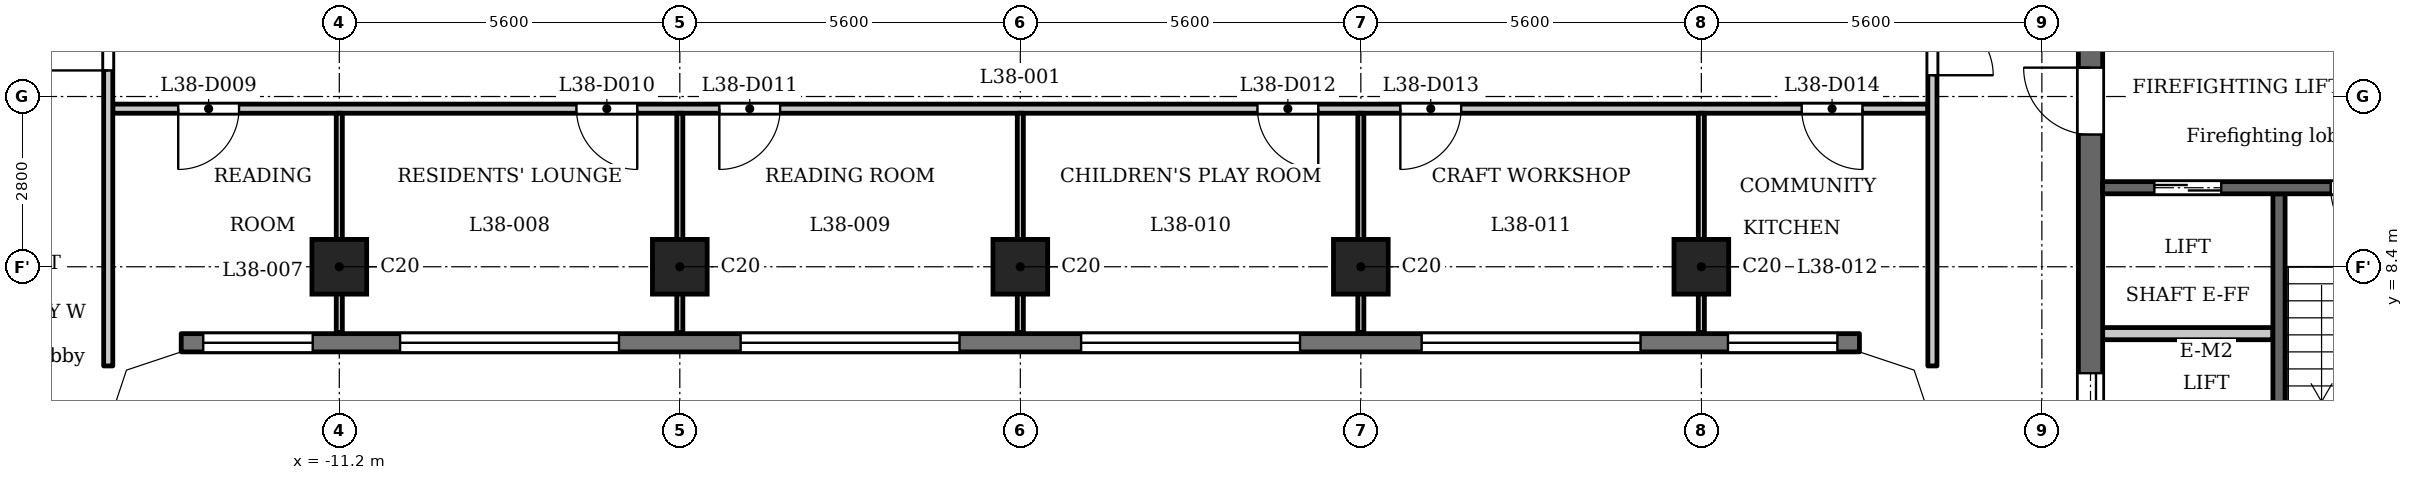
"""IFC4 building model, lengths in metres.
Left out: names, types, materials, properties, quantities, classifications, styles, units other than length and angle.
Written with IfcOpenShell. Run it as: python <this file> out.ifc"""

import sys

from ifc_helpers import new_model, si_unit, direction, frame, frame_2d, origin, origin_2d, place, context, subcontext, project, spatial, polyline, rectangle, outline, extrude, element, fill, save


model = new_model("IFC4")
c1 = context("Model", 3, precision=1e-05, world=origin(), true_north=direction((0.0, 1.0)))
c2 = subcontext(c1, "Body", "Model", "MODEL_VIEW")
j1 = project(units=[si_unit("LENGTHUNIT", "METRE"), si_unit("PLANEANGLEUNIT", "RADIAN")], contexts=[c1])
p1 = place(None, origin())
s1 = spatial("IfcSite", under=j1, at=p1, CompositionType="ELEMENT")
p2 = place(p1, origin())
s2 = spatial("IfcBuilding", under=s1, at=p2, CompositionType="ELEMENT")
p3 = place(p2, frame((0.0, 0.0, 150.1)))
s3 = spatial("IfcBuildingStorey", under=s2, at=p3, CompositionType="ELEMENT", Elevation=150.1)
for number, where, z_axis, x_axis in (
    (1, (-11.2, 8.4, 0.0), (0.0, 0.0, 1.0), (1.0, 0.0, 0.0)),
    (2, (-5.6, 8.4, 0.0), (0.0, 0.0, 1.0), (1.0, 0.0, 0.0)),
    (3, (0.0, 8.4, 0.0), (0.0, 0.0, 1.0), (1.0, 0.0, 0.0)),
    (4, (5.6, 8.4, 0.0), (0.0, 0.0, 1.0), (1.0, 0.0, 0.0)),
    (5, (11.2, 8.4, 0.0), (0.0, 0.0, 1.0), (1.0, 0.0, 0.0)),
):
    element("IfcColumn", number, at=place(p3, frame(where, z_axis=z_axis, x_axis=x_axis)), inside=s3, PredefinedType="COLUMN", context=c2, shape_type="SweptSolid", body=[
        extrude(rectangle(XDim=0.9, YDim=0.9, at=origin_2d()), origin(), (0.0, 0.0, 1.0), 3.5),
    ])
p4 = place(p3, frame((-13.8, 7.15, 0.0), z_axis=(0.0, 0.0, 1.0), x_axis=(1.0, 0.0, 0.0)))
e6 = element("IfcWall", 6, at=p4, inside=s3, PredefinedType="SOLIDWALL", context=c2, shape_type="SweptSolid", body=[
    extrude(rectangle(XDim=27.6, YDim=0.3, at=frame_2d((13.8, 0.0))), origin(), (0.0, 0.0, 1.0), 3.2),
])
p5 = place(p4, frame((0.363, 0.0, 0.9)))
e7 = element("IfcOpeningElement", 7, at=p5, cuts=e6, PredefinedType="OPENING", context=c2, shape_type="SweptSolid", body=[
    extrude(rectangle(XDim=1.8, YDim=1.25, at=frame_2d((0.9, 0.625))), frame((0.0, 0.16, 0.0), z_axis=(0.0, -1.0, 0.0), x_axis=(1.0, 0.0, 0.0)), (0.0, 0.0, 1.0), 0.32),
])
p6 = place(p4, frame((3.6, 0.0, 1.2)))
e8 = element("IfcOpeningElement", 8, at=p6, cuts=e6, PredefinedType="OPENING", context=c2, shape_type="SweptSolid", body=[
    extrude(rectangle(XDim=3.6, YDim=0.95, at=frame_2d((1.8, 0.475))), frame((0.0, 0.16, 0.0), z_axis=(0.0, -1.0, 0.0), x_axis=(1.0, 0.0, 0.0)), (0.0, 0.0, 1.0), 0.32),
])
p7 = place(p4, frame((9.2, 0.0, 1.2)))
e9 = element("IfcOpeningElement", 9, at=p7, cuts=e6, PredefinedType="OPENING", context=c2, shape_type="SweptSolid", body=[
    extrude(rectangle(XDim=3.6, YDim=0.95, at=frame_2d((1.8, 0.475))), frame((0.0, 0.16, 0.0), z_axis=(0.0, -1.0, 0.0), x_axis=(1.0, 0.0, 0.0)), (0.0, 0.0, 1.0), 0.32),
])
p8 = place(p4, frame((14.8, 0.0, 1.2)))
e10 = element("IfcOpeningElement", 10, at=p8, cuts=e6, PredefinedType="OPENING", context=c2, shape_type="SweptSolid", body=[
    extrude(rectangle(XDim=3.6, YDim=0.95, at=frame_2d((1.8, 0.475))), frame((0.0, 0.16, 0.0), z_axis=(0.0, -1.0, 0.0), x_axis=(1.0, 0.0, 0.0)), (0.0, 0.0, 1.0), 0.32),
])
p9 = place(p4, frame((20.4, 0.0, 1.2)))
e11 = element("IfcOpeningElement", 11, at=p9, cuts=e6, PredefinedType="OPENING", context=c2, shape_type="SweptSolid", body=[
    extrude(rectangle(XDim=3.6, YDim=0.95, at=frame_2d((1.8, 0.475))), frame((0.0, 0.16, 0.0), z_axis=(0.0, -1.0, 0.0), x_axis=(1.0, 0.0, 0.0)), (0.0, 0.0, 1.0), 0.32),
])
p10 = place(p4, frame((25.438, 0.0, 0.9)))
e12 = element("IfcOpeningElement", 12, at=p10, cuts=e6, PredefinedType="OPENING", context=c2, shape_type="SweptSolid", body=[
    extrude(rectangle(XDim=1.8, YDim=1.25, at=frame_2d((0.9, 0.625))), frame((0.0, 0.16, 0.0), z_axis=(0.0, -1.0, 0.0), x_axis=(1.0, 0.0, 0.0)), (0.0, 0.0, 1.0), 0.32),
])
p11 = place(p3, frame((20.7, 2.6, 0.0), z_axis=(0.0, 0.0, 1.0), x_axis=(0.0, 1.0, 0.0)))
e13 = element("IfcWall", 13, at=p11, inside=s3, PredefinedType="SHEAR", context=c2, shape_type="SweptSolid", body=[
    extrude(rectangle(XDim=7.0, YDim=0.2, at=frame_2d((3.5, 0.0))), origin(), (0.0, 0.0, 1.0), 3.2),
])
p12 = place(p3, frame((17.6, -12.45, 0.0), z_axis=(0.0, 0.0, 1.0), x_axis=(0.0, 1.0, 0.0)))
e14 = element("IfcWall", 14, at=p12, inside=s3, PredefinedType="SHEAR", context=c2, shape_type="SweptSolid", body=[
    extrude(rectangle(XDim=24.9, YDim=0.4, at=frame_2d((12.45, 0.0))), origin(), (0.0, 0.0, 1.0), 3.2),
])
p13 = place(p12, frame((6.325, 0.0, 0.0)))
e15 = element("IfcOpeningElement", 15, at=p13, cuts=e14, PredefinedType="OPENING", context=c2, shape_type="SweptSolid", body=[
    extrude(rectangle(XDim=0.9, YDim=2.1, at=frame_2d((0.45, 1.05))), frame((0.0, 0.21, 0.0), z_axis=(0.0, -1.0, 0.0), x_axis=(1.0, 0.0, 0.0)), (0.0, 0.0, 1.0), 0.42),
])
p14 = place(p12, frame((9.925, 0.0, 0.0)))
e16 = element("IfcOpeningElement", 16, at=p14, cuts=e14, PredefinedType="OPENING", context=c2, shape_type="SweptSolid", body=[
    extrude(rectangle(XDim=0.9, YDim=2.1, at=frame_2d((0.45, 1.05))), frame((0.0, 0.21, 0.0), z_axis=(0.0, -1.0, 0.0), x_axis=(1.0, 0.0, 0.0)), (0.0, 0.0, 1.0), 0.42),
])
p15 = place(p12, frame((15.6, 0.0, 0.0)))
e17 = element("IfcOpeningElement", 17, at=p15, cuts=e14, PredefinedType="OPENING", context=c2, shape_type="SweptSolid", body=[
    extrude(rectangle(XDim=1.1, YDim=2.1, at=frame_2d((0.55, 1.05))), frame((0.0, 0.21, 0.0), z_axis=(0.0, -1.0, 0.0), x_axis=(1.0, 0.0, 0.0)), (0.0, 0.0, 1.0), 0.42),
])
p16 = place(p12, frame((18.0, 0.0, 0.0)))
e18 = element("IfcOpeningElement", 18, at=p16, cuts=e14, PredefinedType="OPENING", context=c2, shape_type="SweptSolid", body=[
    extrude(rectangle(XDim=1.1, YDim=2.1, at=frame_2d((0.55, 1.05))), frame((0.0, 0.21, 0.0), z_axis=(0.0, -1.0, 0.0), x_axis=(1.0, 0.0, 0.0)), (0.0, 0.0, 1.0), 0.42),
])
p17 = place(p12, frame((23.025, 0.0, 0.0)))
e19 = element("IfcOpeningElement", 19, at=p17, cuts=e14, PredefinedType="OPENING", context=c2, shape_type="SweptSolid", body=[
    extrude(rectangle(XDim=1.1, YDim=2.1, at=frame_2d((0.55, 1.05))), frame((0.0, 0.21, 0.0), z_axis=(0.0, -1.0, 0.0), x_axis=(1.0, 0.0, 0.0)), (0.0, 0.0, 1.0), 0.42),
])
p18 = place(p12, frame((0.775, 0.0, 0.0)))
e20 = element("IfcOpeningElement", 20, at=p18, cuts=e14, PredefinedType="OPENING", context=c2, shape_type="SweptSolid", body=[
    extrude(rectangle(XDim=1.1, YDim=2.1, at=frame_2d((0.55, 1.05))), frame((0.0, 0.21, 0.0), z_axis=(0.0, -1.0, 0.0), x_axis=(1.0, 0.0, 0.0)), (0.0, 0.0, 1.0), 0.42),
])
p19 = place(p12, frame((12.925, 0.0, 0.0)))
e21 = element("IfcOpeningElement", 21, at=p19, cuts=e14, PredefinedType="OPENING", context=c2, shape_type="SweptSolid", body=[
    extrude(rectangle(XDim=1.8, YDim=2.1, at=frame_2d((0.9, 1.05))), frame((0.0, 0.21, 0.0), z_axis=(0.0, -1.0, 0.0), x_axis=(1.0, 0.0, 0.0)), (0.0, 0.0, 1.0), 0.42),
])
p20 = place(p3, frame((17.8, 7.3, 0.0), z_axis=(0.0, 0.0, 1.0), x_axis=(1.0, 0.0, 0.0)))
e22 = element("IfcWall", 22, at=p20, inside=s3, PredefinedType="PARTITIONING", context=c2, shape_type="SweptSolid", body=[
    extrude(rectangle(XDim=2.8, YDim=0.2, at=frame_2d((1.4, 0.0))), origin(), (0.0, 0.0, 1.0), 3.2),
])
p21 = place(p3, frame((17.8, 9.7, 0.0), z_axis=(0.0, 0.0, 1.0), x_axis=(1.0, 0.0, 0.0)))
e23 = element("IfcWall", 23, at=p21, inside=s3, PredefinedType="SHEAR", context=c2, shape_type="SweptSolid", body=[
    extrude(rectangle(XDim=8.45, YDim=0.2, at=frame_2d((4.225, 0.0))), origin(), (0.0, 0.0, 1.0), 3.2),
])
p22 = place(p21, frame((0.85, 0.0, 0.0)))
e24 = element("IfcOpeningElement", 24, at=p22, cuts=e23, PredefinedType="OPENING", context=c2, shape_type="SweptSolid", body=[
    extrude(rectangle(XDim=1.1, YDim=2.1, at=frame_2d((0.55, 1.05))), frame((0.0, 0.11, 0.0), z_axis=(0.0, -1.0, 0.0), x_axis=(1.0, 0.0, 0.0)), (0.0, 0.0, 1.0), 0.22),
])
p23 = place(p21, frame((3.75, 0.0, 0.0)))
e25 = element("IfcOpeningElement", 25, at=p23, cuts=e23, PredefinedType="OPENING", context=c2, shape_type="SweptSolid", body=[
    extrude(rectangle(XDim=1.1, YDim=2.1, at=frame_2d((0.55, 1.05))), frame((0.0, 0.11, 0.0), z_axis=(0.0, -1.0, 0.0), x_axis=(1.0, 0.0, 0.0)), (0.0, 0.0, 1.0), 0.22),
])
p24 = place(p3, frame((-14.925, 11.0, 0.0), z_axis=(0.0, 0.0, 1.0), x_axis=(1.0, 0.0, 0.0)))
e26 = element("IfcWall", 26, at=p24, inside=s3, PredefinedType="PARTITIONING", context=c2, shape_type="SweptSolid", body=[
    extrude(rectangle(XDim=29.85, YDim=0.15, at=frame_2d((14.925, 0.0))), origin(), (0.0, 0.0, 1.0), 3.2),
])
p25 = place(p24, frame((1.076, 0.0, 0.0)))
e27 = element("IfcOpeningElement", 27, at=p25, cuts=e26, PredefinedType="OPENING", context=c2, shape_type="SweptSolid", body=[
    extrude(rectangle(XDim=1.0, YDim=2.1, at=frame_2d((0.5, 1.05))), frame((0.0, 0.085, 0.0), z_axis=(0.0, -1.0, 0.0), x_axis=(1.0, 0.0, 0.0)), (0.0, 0.0, 1.0), 0.17),
])
p26 = place(p24, frame((7.625, 0.0, 0.0)))
e28 = element("IfcOpeningElement", 28, at=p26, cuts=e26, PredefinedType="OPENING", context=c2, shape_type="SweptSolid", body=[
    extrude(rectangle(XDim=1.0, YDim=2.1, at=frame_2d((0.5, 1.05))), frame((0.0, 0.085, 0.0), z_axis=(0.0, -1.0, 0.0), x_axis=(1.0, 0.0, 0.0)), (0.0, 0.0, 1.0), 0.17),
])
p27 = place(p24, frame((9.975, 0.0, 0.0)))
e29 = element("IfcOpeningElement", 29, at=p27, cuts=e26, PredefinedType="OPENING", context=c2, shape_type="SweptSolid", body=[
    extrude(rectangle(XDim=1.0, YDim=2.1, at=frame_2d((0.5, 1.05))), frame((0.0, 0.085, 0.0), z_axis=(0.0, -1.0, 0.0), x_axis=(1.0, 0.0, 0.0)), (0.0, 0.0, 1.0), 0.17),
])
p28 = place(p24, frame((18.825, 0.0, 0.0)))
e30 = element("IfcOpeningElement", 30, at=p28, cuts=e26, PredefinedType="OPENING", context=c2, shape_type="SweptSolid", body=[
    extrude(rectangle(XDim=1.0, YDim=2.1, at=frame_2d((0.5, 1.05))), frame((0.0, 0.085, 0.0), z_axis=(0.0, -1.0, 0.0), x_axis=(1.0, 0.0, 0.0)), (0.0, 0.0, 1.0), 0.17),
])
p29 = place(p24, frame((21.175, 0.0, 0.0)))
e31 = element("IfcOpeningElement", 31, at=p29, cuts=e26, PredefinedType="OPENING", context=c2, shape_type="SweptSolid", body=[
    extrude(rectangle(XDim=1.0, YDim=2.1, at=frame_2d((0.5, 1.05))), frame((0.0, 0.085, 0.0), z_axis=(0.0, -1.0, 0.0), x_axis=(1.0, 0.0, 0.0)), (0.0, 0.0, 1.0), 0.17),
])
p30 = place(p24, frame((27.775, 0.0, 0.0)))
e32 = element("IfcOpeningElement", 32, at=p30, cuts=e26, PredefinedType="OPENING", context=c2, shape_type="SweptSolid", body=[
    extrude(rectangle(XDim=1.0, YDim=2.1, at=frame_2d((0.5, 1.05))), frame((0.0, 0.085, 0.0), z_axis=(0.0, -1.0, 0.0), x_axis=(1.0, 0.0, 0.0)), (0.0, 0.0, 1.0), 0.17),
])
p31 = place(p3, frame((-15.0, 6.769, 0.0), z_axis=(0.0, 0.0, 1.0), x_axis=(0.0, 1.0, 0.0)))
e33 = element("IfcWall", 33, at=p31, inside=s3, PredefinedType="PARTITIONING", context=c2, shape_type="SweptSolid", body=[
    extrude(rectangle(XDim=6.356, YDim=0.15, at=frame_2d((3.178, 0.0))), origin(), (0.0, 0.0, 1.0), 3.2),
])
p32 = place(p31, frame((4.86, 0.0, 0.0)))
e34 = element("IfcOpeningElement", 34, at=p32, cuts=e33, PredefinedType="OPENING", context=c2, shape_type="SweptSolid", body=[
    extrude(rectangle(XDim=1.0, YDim=2.1, at=frame_2d((0.5, 1.05))), frame((0.0, 0.085, 0.0), z_axis=(0.0, -1.0, 0.0), x_axis=(1.0, 0.0, 0.0)), (0.0, 0.0, 1.0), 0.17),
])
for number, where, z_axis, x_axis in (
    (35, (-11.2, 7.32, 0.0), (0.0, 0.0, 1.0), (0.0, 1.0, 0.0)),
    (36, (-5.6, 7.32, 0.0), (0.0, 0.0, 1.0), (0.0, 1.0, 0.0)),
    (37, (0.0, 7.32, 0.0), (0.0, 0.0, 1.0), (0.0, 1.0, 0.0)),
    (38, (5.6, 7.32, 0.0), (0.0, 0.0, 1.0), (0.0, 1.0, 0.0)),
    (39, (11.2, 7.32, 0.0), (0.0, 0.0, 1.0), (0.0, 1.0, 0.0)),
):
    element("IfcWall", number, at=place(p3, frame(where, z_axis=z_axis, x_axis=x_axis)), inside=s3, PredefinedType="PARTITIONING", context=c2, shape_type="SweptSolid", body=[
        extrude(rectangle(XDim=3.605, YDim=0.1, at=frame_2d((1.802, 0.0))), origin(), (0.0, 0.0, 1.0), 3.2),
    ])
p33 = place(p3, frame((15.0, 6.769, 0.0), z_axis=(0.0, 0.0, 1.0), x_axis=(0.0, 1.0, 0.0)))
e40 = element("IfcWall", 40, at=p33, inside=s3, PredefinedType="PARTITIONING", context=c2, shape_type="SweptSolid", body=[
    extrude(rectangle(XDim=6.356, YDim=0.15, at=frame_2d((3.178, 0.0))), origin(), (0.0, 0.0, 1.0), 3.2),
])
p34 = place(p33, frame((4.781, 0.0, 0.0)))
e41 = element("IfcOpeningElement", 41, at=p34, cuts=e40, PredefinedType="OPENING", context=c2, shape_type="SweptSolid", body=[
    extrude(rectangle(XDim=1.0, YDim=2.1, at=frame_2d((0.5, 1.05))), frame((0.0, 0.085, 0.0), z_axis=(0.0, -1.0, 0.0), x_axis=(1.0, 0.0, 0.0)), (0.0, 0.0, 1.0), 0.17),
])
p35 = place(p3, origin())
e42 = element("IfcWall", 42, at=p35, inside=s3, PredefinedType="SOLIDWALL", context=c2, shape_type="SweptSolid", body=[
    extrude(outline(polyline([(-13.849, 7.3), (-14.937, 6.937), (-15.3, 5.849), (-15.3, 5.8), (-15.0, 5.8), (-14.7, 6.7), (-13.8, 7.0), (-13.8, 7.3), (-13.849, 7.3)])), origin(), (0.0, 0.0, 1.0), 3.2),
])
e43 = element("IfcWall", 43, at=p35, inside=s3, PredefinedType="SOLIDWALL", context=c2, shape_type="SweptSolid", body=[
    extrude(outline(polyline([(14.937, 6.937), (13.849, 7.3), (13.8, 7.3), (13.8, 7.0), (14.7, 6.7), (15.0, 5.8), (15.3, 5.8), (15.3, 5.849), (14.937, 6.937)])), origin(), (0.0, 0.0, 1.0), 3.2),
])
p36 = place(p16, origin())
e44 = element("IfcDoor", 44, at=p36, inside=s3, OperationType="DOUBLE_DOOR_SLIDING", PredefinedType="DOOR", context=c2, shape_type="SweptSolid", body=[
    extrude(rectangle(XDim=1.1, YDim=2.1, at=frame_2d((0.55, 1.05))), frame((0.0, 0.025, 0.0), z_axis=(0.0, -1.0, 0.0), x_axis=(1.0, 0.0, 0.0)), (0.0, 0.0, 1.0), 0.05),
])
fill(e18, e44)
p37 = place(p22, origin())
e45 = element("IfcDoor", 45, at=p37, inside=s3, OperationType="DOUBLE_DOOR_SLIDING", PredefinedType="DOOR", context=c2, shape_type="SweptSolid", body=[
    extrude(rectangle(XDim=1.1, YDim=2.1, at=frame_2d((0.55, 1.05))), frame((0.0, 0.025, 0.0), z_axis=(0.0, -1.0, 0.0), x_axis=(1.0, 0.0, 0.0)), (0.0, 0.0, 1.0), 0.05),
])
fill(e24, e45)
p38 = place(p17, origin())
e46 = element("IfcDoor", 46, at=p38, inside=s3, OperationType="SINGLE_SWING_LEFT", PredefinedType="DOOR", context=c2, shape_type="SweptSolid", body=[
    extrude(rectangle(XDim=1.1, YDim=2.1, at=frame_2d((0.55, 1.05))), frame((0.0, 0.025, 0.0), z_axis=(0.0, -1.0, 0.0), x_axis=(1.0, 0.0, 0.0)), (0.0, 0.0, 1.0), 0.05),
])
fill(e19, e46)
p39 = place(p23, origin())
e47 = element("IfcDoor", 47, at=p39, inside=s3, OperationType="SINGLE_SWING_RIGHT", PredefinedType="DOOR", context=c2, shape_type="SweptSolid", body=[
    extrude(rectangle(XDim=1.1, YDim=2.1, at=frame_2d((0.55, 1.05))), frame((0.0, 0.025, 0.0), z_axis=(0.0, -1.0, 0.0), x_axis=(1.0, 0.0, 0.0)), (0.0, 0.0, 1.0), 0.05),
])
fill(e25, e47)
p40 = place(p32, origin())
e48 = element("IfcDoor", 48, at=p40, inside=s3, OperationType="SINGLE_SWING_RIGHT", PredefinedType="DOOR", context=c2, shape_type="SweptSolid", body=[
    extrude(rectangle(XDim=1.0, YDim=2.1, at=frame_2d((0.5, 1.05))), frame((0.0, 0.025, 0.0), z_axis=(0.0, -1.0, 0.0), x_axis=(1.0, 0.0, 0.0)), (0.0, 0.0, 1.0), 0.05),
])
fill(e34, e48)
p41 = place(p34, origin())
e49 = element("IfcDoor", 49, at=p41, inside=s3, OperationType="SINGLE_SWING_LEFT", PredefinedType="DOOR", context=c2, shape_type="SweptSolid", body=[
    extrude(rectangle(XDim=1.0, YDim=2.1, at=frame_2d((0.5, 1.05))), frame((0.0, 0.025, 0.0), z_axis=(0.0, -1.0, 0.0), x_axis=(1.0, 0.0, 0.0)), (0.0, 0.0, 1.0), 0.05),
])
fill(e41, e49)
p42 = place(p25, origin())
e50 = element("IfcDoor", 50, at=p42, inside=s3, OperationType="SINGLE_SWING_LEFT", PredefinedType="DOOR", context=c2, shape_type="SweptSolid", body=[
    extrude(rectangle(XDim=1.0, YDim=2.1, at=frame_2d((0.5, 1.05))), frame((0.0, 0.025, 0.0), z_axis=(0.0, -1.0, 0.0), x_axis=(1.0, 0.0, 0.0)), (0.0, 0.0, 1.0), 0.05),
])
fill(e27, e50)
p43 = place(p26, origin())
e51 = element("IfcDoor", 51, at=p43, inside=s3, OperationType="SINGLE_SWING_RIGHT", PredefinedType="DOOR", context=c2, shape_type="SweptSolid", body=[
    extrude(rectangle(XDim=1.0, YDim=2.1, at=frame_2d((0.5, 1.05))), frame((0.0, 0.025, 0.0), z_axis=(0.0, -1.0, 0.0), x_axis=(1.0, 0.0, 0.0)), (0.0, 0.0, 1.0), 0.05),
])
fill(e28, e51)
p44 = place(p27, origin())
e52 = element("IfcDoor", 52, at=p44, inside=s3, OperationType="SINGLE_SWING_LEFT", PredefinedType="DOOR", context=c2, shape_type="SweptSolid", body=[
    extrude(rectangle(XDim=1.0, YDim=2.1, at=frame_2d((0.5, 1.05))), frame((0.0, 0.025, 0.0), z_axis=(0.0, -1.0, 0.0), x_axis=(1.0, 0.0, 0.0)), (0.0, 0.0, 1.0), 0.05),
])
fill(e29, e52)
p45 = place(p28, origin())
e53 = element("IfcDoor", 53, at=p45, inside=s3, OperationType="SINGLE_SWING_RIGHT", PredefinedType="DOOR", context=c2, shape_type="SweptSolid", body=[
    extrude(rectangle(XDim=1.0, YDim=2.1, at=frame_2d((0.5, 1.05))), frame((0.0, 0.025, 0.0), z_axis=(0.0, -1.0, 0.0), x_axis=(1.0, 0.0, 0.0)), (0.0, 0.0, 1.0), 0.05),
])
fill(e30, e53)
p46 = place(p29, origin())
e54 = element("IfcDoor", 54, at=p46, inside=s3, OperationType="SINGLE_SWING_LEFT", PredefinedType="DOOR", context=c2, shape_type="SweptSolid", body=[
    extrude(rectangle(XDim=1.0, YDim=2.1, at=frame_2d((0.5, 1.05))), frame((0.0, 0.025, 0.0), z_axis=(0.0, -1.0, 0.0), x_axis=(1.0, 0.0, 0.0)), (0.0, 0.0, 1.0), 0.05),
])
fill(e31, e54)
p47 = place(p30, origin())
e55 = element("IfcDoor", 55, at=p47, inside=s3, OperationType="SINGLE_SWING_RIGHT", PredefinedType="DOOR", context=c2, shape_type="SweptSolid", body=[
    extrude(rectangle(XDim=1.0, YDim=2.1, at=frame_2d((0.5, 1.05))), frame((0.0, 0.025, 0.0), z_axis=(0.0, -1.0, 0.0), x_axis=(1.0, 0.0, 0.0)), (0.0, 0.0, 1.0), 0.05),
])
fill(e32, e55)
p48 = place(p5, origin())
e56 = element("IfcWindow", 56, at=p48, inside=s3, PartitioningType="SINGLE_PANEL", PredefinedType="WINDOW", context=c2, shape_type="SweptSolid", body=[
    extrude(rectangle(XDim=1.8, YDim=1.25, at=frame_2d((0.9, 0.625))), frame((0.0, 0.03, 0.0), z_axis=(0.0, -1.0, 0.0), x_axis=(1.0, 0.0, 0.0)), (0.0, 0.0, 1.0), 0.06),
])
fill(e7, e56)
p49 = place(p6, origin())
e57 = element("IfcWindow", 57, at=p49, inside=s3, PartitioningType="SINGLE_PANEL", PredefinedType="WINDOW", context=c2, shape_type="SweptSolid", body=[
    extrude(rectangle(XDim=3.6, YDim=0.95, at=frame_2d((1.8, 0.475))), frame((0.0, 0.03, 0.0), z_axis=(0.0, -1.0, 0.0), x_axis=(1.0, 0.0, 0.0)), (0.0, 0.0, 1.0), 0.06),
])
fill(e8, e57)
p50 = place(p7, origin())
e58 = element("IfcWindow", 58, at=p50, inside=s3, PartitioningType="SINGLE_PANEL", PredefinedType="WINDOW", context=c2, shape_type="SweptSolid", body=[
    extrude(rectangle(XDim=3.6, YDim=0.95, at=frame_2d((1.8, 0.475))), frame((0.0, 0.03, 0.0), z_axis=(0.0, -1.0, 0.0), x_axis=(1.0, 0.0, 0.0)), (0.0, 0.0, 1.0), 0.06),
])
fill(e9, e58)
p51 = place(p8, origin())
e59 = element("IfcWindow", 59, at=p51, inside=s3, PartitioningType="SINGLE_PANEL", PredefinedType="WINDOW", context=c2, shape_type="SweptSolid", body=[
    extrude(rectangle(XDim=3.6, YDim=0.95, at=frame_2d((1.8, 0.475))), frame((0.0, 0.03, 0.0), z_axis=(0.0, -1.0, 0.0), x_axis=(1.0, 0.0, 0.0)), (0.0, 0.0, 1.0), 0.06),
])
fill(e10, e59)
p52 = place(p9, origin())
e60 = element("IfcWindow", 60, at=p52, inside=s3, PartitioningType="SINGLE_PANEL", PredefinedType="WINDOW", context=c2, shape_type="SweptSolid", body=[
    extrude(rectangle(XDim=3.6, YDim=0.95, at=frame_2d((1.8, 0.475))), frame((0.0, 0.03, 0.0), z_axis=(0.0, -1.0, 0.0), x_axis=(1.0, 0.0, 0.0)), (0.0, 0.0, 1.0), 0.06),
])
fill(e11, e60)
p53 = place(p10, origin())
e61 = element("IfcWindow", 61, at=p53, inside=s3, PartitioningType="SINGLE_PANEL", PredefinedType="WINDOW", context=c2, shape_type="SweptSolid", body=[
    extrude(rectangle(XDim=1.8, YDim=1.25, at=frame_2d((0.9, 0.625))), frame((0.0, 0.03, 0.0), z_axis=(0.0, -1.0, 0.0), x_axis=(1.0, 0.0, 0.0)), (0.0, 0.0, 1.0), 0.06),
])
fill(e12, e61)
save(model, sys.argv[1])
